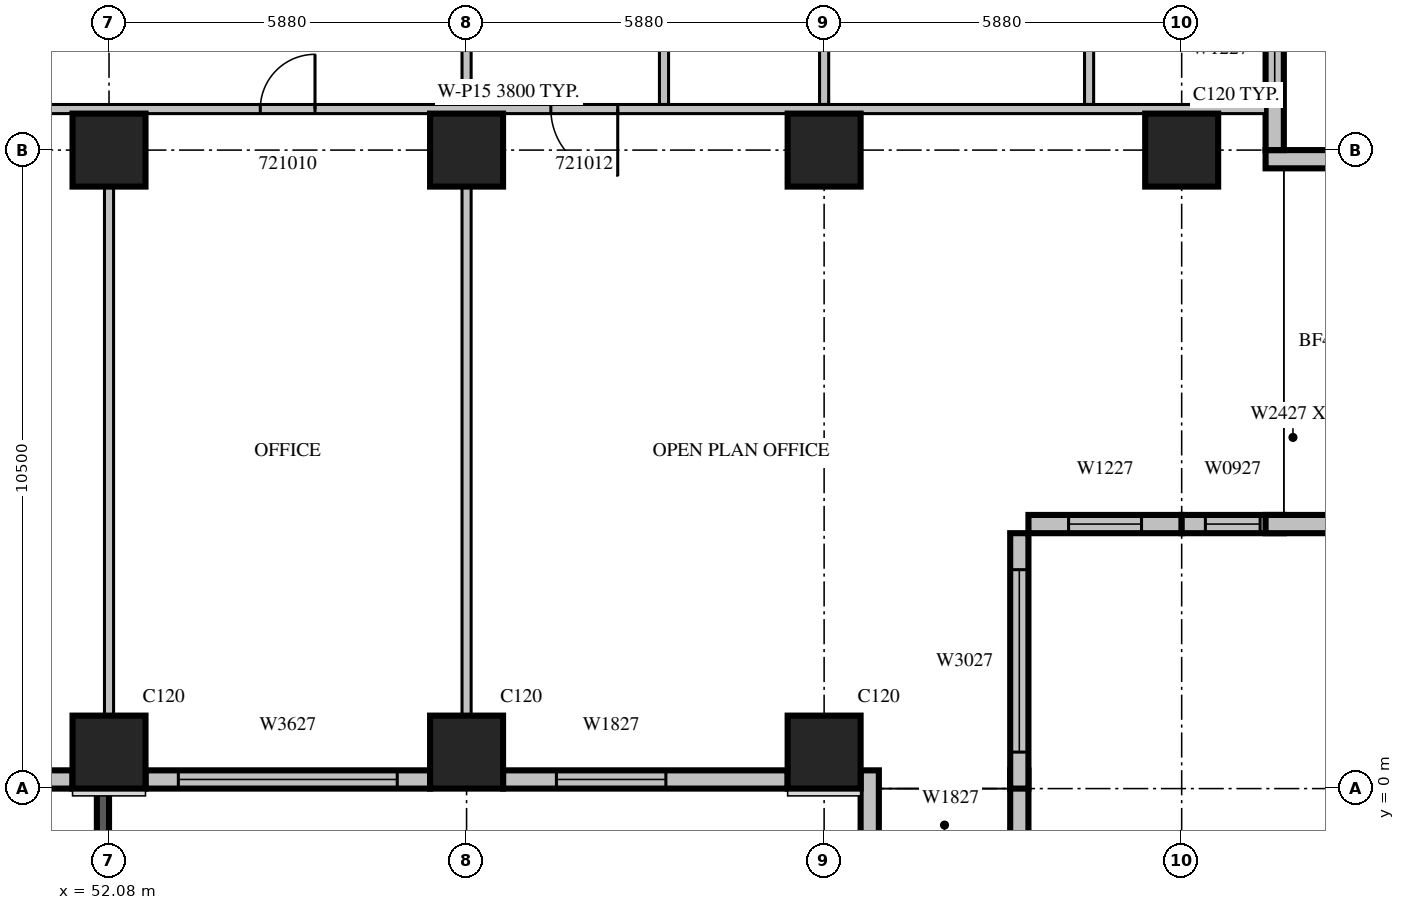
"""IFC4 building model, lengths in metres.
Left out: names, types, materials, properties, quantities, classifications, styles, units other than length and angle.
Written with IfcOpenShell. Run it as: python <this file> out.ifc"""

import sys

from ifc_helpers import new_model, si_unit, direction, frame, frame_2d, origin, origin_2d, place, context, subcontext, project, spatial, rectangle, extrude, source, transform, mapped, element, fill, save


model = new_model("IFC4")
c1 = context("Model", 3, precision=1e-05, world=origin(), true_north=direction((0.0, 1.0)))
c2 = subcontext(c1, "Body", "Model", "MODEL_VIEW")
j1 = project(units=[si_unit("LENGTHUNIT", "METRE"), si_unit("PLANEANGLEUNIT", "RADIAN")], contexts=[c1])
p1 = place(None, origin())
s1 = spatial("IfcSite", under=j1, at=p1, CompositionType="ELEMENT")
p2 = place(p1, origin())
s2 = spatial("IfcBuilding", under=s1, at=p2, CompositionType="ELEMENT")
p3 = place(p2, frame((0.0, 0.0, 99.3)))
s3 = spatial("IfcBuildingStorey", under=s2, at=p3, CompositionType="ELEMENT", Elevation=99.3)
m1 = source(origin(), c2, "Body", "SweptSolid", [
    extrude(rectangle(XDim=1.2, YDim=1.2, at=origin_2d()), origin(), (0.0, 0.0, 1.0), 4.2),
])
for number, where, z_axis, x_axis in (
    (1, (52.08, 0.6, 0.0), (0.0, 0.0, 1.0), (1.0, 0.0, 0.0)),
    (2, (57.96, 0.6, 0.0), (0.0, 0.0, 1.0), (1.0, 0.0, 0.0)),
    (3, (63.84, 0.6, 0.0), (0.0, 0.0, 1.0), (1.0, 0.0, 0.0)),
    (4, (52.08, 10.5, 0.0), (0.0, 0.0, 1.0), (1.0, 0.0, 0.0)),
    (5, (57.96, 10.5, 0.0), (0.0, 0.0, 1.0), (1.0, 0.0, 0.0)),
    (6, (63.84, 10.5, 0.0), (0.0, 0.0, 1.0), (1.0, 0.0, 0.0)),
    (7, (69.72, 10.5, 0.0), (0.0, 0.0, 1.0), (1.0, 0.0, 0.0)),
):
    element("IfcColumn", number, at=place(p3, frame(where, z_axis=z_axis, x_axis=x_axis)), inside=s3, PredefinedType="COLUMN", context=c2, shape_type="MappedRepresentation", body=[
        mapped(m1, transform((0.0, 0.0, 0.0), scale=1.0)),
    ])
m2 = source(origin(), c2, "Body", "SweptSolid", [
    extrude(rectangle(XDim=3.9, YDim=0.2, at=frame_2d((1.95, 0.0))), origin(), (0.0, 0.0, 1.0), 3.8),
])
p4 = place(p3, frame((51.98, 0.0, 0.0), z_axis=(0.0, 0.0, 1.0), x_axis=(0.0, -1.0, 0.0)))
e8 = element("IfcWall", 8, at=p4, inside=s3, PredefinedType="SOLIDWALL", context=c2, shape_type="MappedRepresentation", body=[
    mapped(m2, transform((0.0, 0.0, 0.0), scale=1.0)),
])
m3 = source(origin(), c2, "Body", "SweptSolid", [
    extrude(rectangle(XDim=2.4, YDim=2.7, at=frame_2d((1.2, 1.35))), frame((0.0, 0.11, 0.0), z_axis=(0.0, -1.0, 0.0), x_axis=(1.0, 0.0, 0.0)), (0.0, 0.0, 1.0), 0.22),
])
p5 = place(p4, frame((0.75, 0.0, 0.6)))
e9 = element("IfcOpeningElement", 9, at=p5, cuts=e8, PredefinedType="OPENING", context=c2, shape_type="MappedRepresentation", body=[
    mapped(m3, transform((0.0, 0.0, 0.0), scale=1.0)),
])
m4 = source(origin(), c2, "Body", "SweptSolid", [
    extrude(rectangle(XDim=4.68, YDim=0.3, at=frame_2d((2.34, 0.0))), origin(), (0.0, 0.0, 1.0), 3.8),
])
p6 = place(p3, frame((46.8, 0.15, 0.0), z_axis=(0.0, 0.0, 1.0), x_axis=(1.0, 0.0, 0.0)))
e10 = element("IfcWall", 10, at=p6, inside=s3, PredefinedType="STANDARD", context=c2, shape_type="MappedRepresentation", body=[
    mapped(m4, transform((0.0, 0.0, 0.0), scale=1.0)),
])
m5 = source(origin(), c2, "Body", "SweptSolid", [
    extrude(rectangle(XDim=1.0, YDim=2.1, at=frame_2d((0.5, 1.05))), frame((0.0, 0.16, 0.0), z_axis=(0.0, -1.0, 0.0), x_axis=(1.0, 0.0, 0.0)), (0.0, 0.0, 1.0), 0.32),
])
p7 = place(p6, frame((1.84, 0.0, 0.0)))
e11 = element("IfcOpeningElement", 11, at=p7, cuts=e10, PredefinedType="OPENING", context=c2, shape_type="MappedRepresentation", body=[
    mapped(m5, transform((0.0, 0.0, 0.0), scale=1.0)),
])
p8 = place(p3, frame((52.68, 0.15, 0.0), z_axis=(0.0, 0.0, 1.0), x_axis=(1.0, 0.0, 0.0)))
e12 = element("IfcWall", 12, at=p8, inside=s3, PredefinedType="STANDARD", context=c2, shape_type="MappedRepresentation", body=[
    mapped(m4, transform((0.0, 0.0, 0.0), scale=1.0)),
])
m6 = source(origin(), c2, "Body", "SweptSolid", [
    extrude(rectangle(XDim=3.6, YDim=2.7, at=frame_2d((1.8, 1.35))), frame((0.0, 0.16, 0.0), z_axis=(0.0, -1.0, 0.0), x_axis=(1.0, 0.0, 0.0)), (0.0, 0.0, 1.0), 0.32),
])
p9 = place(p8, frame((0.54, 0.0, 0.6)))
e13 = element("IfcOpeningElement", 13, at=p9, cuts=e12, PredefinedType="OPENING", context=c2, shape_type="MappedRepresentation", body=[
    mapped(m6, transform((0.0, 0.0, 0.0), scale=1.0)),
])
p10 = place(p3, frame((58.56, 0.15, 0.0), z_axis=(0.0, 0.0, 1.0), x_axis=(1.0, 0.0, 0.0)))
e14 = element("IfcWall", 14, at=p10, inside=s3, PredefinedType="STANDARD", context=c2, shape_type="MappedRepresentation", body=[
    mapped(m4, transform((0.0, 0.0, 0.0), scale=1.0)),
])
m7 = source(origin(), c2, "Body", "SweptSolid", [
    extrude(rectangle(XDim=1.8, YDim=2.7, at=frame_2d((0.9, 1.35))), frame((0.0, 0.16, 0.0), z_axis=(0.0, -1.0, 0.0), x_axis=(1.0, 0.0, 0.0)), (0.0, 0.0, 1.0), 0.32),
])
p11 = place(p10, frame((0.877, 0.0, 0.6)))
e15 = element("IfcOpeningElement", 15, at=p11, cuts=e14, PredefinedType="OPENING", context=c2, shape_type="MappedRepresentation", body=[
    mapped(m7, transform((0.0, 0.0, 0.0), scale=1.0)),
])
m8 = source(origin(), c2, "Body", "SweptSolid", [
    extrude(rectangle(XDim=1.2, YDim=0.3, at=frame_2d((0.6, 0.0))), origin(), (0.0, 0.0, 1.0), 3.8),
])
for number, where, z_axis, x_axis in (
    (16, (64.59, 0.3, 0.0), (0.0, 0.0, 1.0), (0.0, -1.0, 0.0)),
    (17, (67.05, 0.3, 0.0), (0.0, 0.0, 1.0), (0.0, -1.0, 0.0)),
):
    element("IfcWall", number, at=place(p3, frame(where, z_axis=z_axis, x_axis=x_axis)), inside=s3, PredefinedType="STANDARD", context=c2, shape_type="MappedRepresentation", body=[
        mapped(m8, transform((0.0, 0.0, 0.0), scale=1.0)),
    ])
m9 = source(origin(), c2, "Body", "SweptSolid", [
    extrude(rectangle(XDim=4.2, YDim=0.3, at=frame_2d((2.1, 0.0))), origin(), (0.0, 0.0, 1.0), 3.8),
])
p12 = place(p3, frame((67.05, 0.0, 0.0), z_axis=(0.0, 0.0, 1.0), x_axis=(0.0, 1.0, 0.0)))
e18 = element("IfcWall", 18, at=p12, inside=s3, PredefinedType="STANDARD", context=c2, shape_type="MappedRepresentation", body=[
    mapped(m9, transform((0.0, 0.0, 0.0), scale=1.0)),
])
m10 = source(origin(), c2, "Body", "SweptSolid", [
    extrude(rectangle(XDim=3.0, YDim=2.7, at=frame_2d((1.5, 1.35))), frame((0.0, 0.16, 0.0), z_axis=(0.0, -1.0, 0.0), x_axis=(1.0, 0.0, 0.0)), (0.0, 0.0, 1.0), 0.32),
])
p13 = place(p12, frame((0.6, 0.0, 0.6)))
e19 = element("IfcOpeningElement", 19, at=p13, cuts=e18, PredefinedType="OPENING", context=c2, shape_type="MappedRepresentation", body=[
    mapped(m10, transform((0.0, 0.0, 0.0), scale=1.0)),
])
m11 = source(origin(), c2, "Body", "SweptSolid", [
    extrude(rectangle(XDim=2.52, YDim=0.3, at=frame_2d((1.26, 0.0))), origin(), (0.0, 0.0, 1.0), 3.8),
])
p14 = place(p3, frame((67.2, 4.35, 0.0), z_axis=(0.0, 0.0, 1.0), x_axis=(1.0, 0.0, 0.0)))
e20 = element("IfcWall", 20, at=p14, inside=s3, PredefinedType="STANDARD", context=c2, shape_type="MappedRepresentation", body=[
    mapped(m11, transform((0.0, 0.0, 0.0), scale=1.0)),
])
m12 = source(origin(), c2, "Body", "SweptSolid", [
    extrude(rectangle(XDim=1.2, YDim=2.7, at=frame_2d((0.6, 1.35))), frame((0.0, 0.16, 0.0), z_axis=(0.0, -1.0, 0.0), x_axis=(1.0, 0.0, 0.0)), (0.0, 0.0, 1.0), 0.32),
])
p15 = place(p14, frame((0.66, 0.0, 0.6)))
e21 = element("IfcOpeningElement", 21, at=p15, cuts=e20, PredefinedType="OPENING", context=c2, shape_type="MappedRepresentation", body=[
    mapped(m12, transform((0.0, 0.0, 0.0), scale=1.0)),
])
m13 = source(origin(), c2, "Body", "SweptSolid", [
    extrude(rectangle(XDim=1.68, YDim=0.3, at=frame_2d((0.84, 0.0))), origin(), (0.0, 0.0, 1.0), 3.8),
])
p16 = place(p3, frame((69.72, 4.35, 0.0), z_axis=(0.0, 0.0, 1.0), x_axis=(1.0, 0.0, 0.0)))
e22 = element("IfcWall", 22, at=p16, inside=s3, PredefinedType="STANDARD", context=c2, shape_type="MappedRepresentation", body=[
    mapped(m13, transform((0.0, 0.0, 0.0), scale=1.0)),
])
m14 = source(origin(), c2, "Body", "SweptSolid", [
    extrude(rectangle(XDim=0.9, YDim=2.7, at=frame_2d((0.45, 1.35))), frame((0.0, 0.16, 0.0), z_axis=(0.0, -1.0, 0.0), x_axis=(1.0, 0.0, 0.0)), (0.0, 0.0, 1.0), 0.32),
])
p17 = place(p16, frame((0.39, 0.0, 0.6)))
e23 = element("IfcOpeningElement", 23, at=p17, cuts=e22, PredefinedType="OPENING", context=c2, shape_type="MappedRepresentation", body=[
    mapped(m14, transform((0.0, 0.0, 0.0), scale=1.0)),
])
for number, where, z_axis, x_axis in (
    (24, (71.1, 4.35, 0.0), (0.0, 0.0, 1.0), (1.0, 0.0, 0.0)),
    (25, (71.1, 10.35, 0.0), (0.0, 0.0, 1.0), (1.0, 0.0, 0.0)),
):
    element("IfcWall", number, at=place(p3, frame(where, z_axis=z_axis, x_axis=x_axis)), inside=s3, PredefinedType="STANDARD", context=c2, shape_type="MappedRepresentation", body=[
        mapped(m8, transform((0.0, 0.0, 0.0), scale=1.0)),
    ])
m15 = source(origin(), c2, "Body", "SweptSolid", [
    extrude(rectangle(XDim=6.3, YDim=0.3, at=frame_2d((3.15, 0.0))), origin(), (0.0, 0.0, 1.0), 3.8),
])
p18 = place(p3, frame((71.25, 10.5, 0.0), z_axis=(0.0, 0.0, 1.0), x_axis=(0.0, 1.0, 0.0)))
e26 = element("IfcWall", 26, at=p18, inside=s3, PredefinedType="STANDARD", context=c2, shape_type="MappedRepresentation", body=[
    mapped(m15, transform((0.0, 0.0, 0.0), scale=1.0)),
])
p19 = place(p18, frame((1.062, 0.0, 0.6)))
e27 = element("IfcOpeningElement", 27, at=p19, cuts=e26, PredefinedType="OPENING", context=c2, shape_type="MappedRepresentation", body=[
    mapped(m12, transform((0.0, 0.0, 0.0), scale=1.0)),
])
m16 = source(origin(), c2, "Body", "SweptSolid", [
    extrude(rectangle(XDim=8.702, YDim=0.15, at=frame_2d((4.351, 0.0))), origin(), (0.0, 0.0, 1.0), 3.8),
])
p20 = place(p3, frame((52.08, 1.199, 0.0), z_axis=(0.0, 0.0, 1.0), x_axis=(0.0, 1.0, 0.0)))
e28 = element("IfcWall", 28, at=p20, inside=s3, PredefinedType="PARTITIONING", context=c2, shape_type="MappedRepresentation", body=[
    mapped(m16, transform((0.0, 0.0, 0.0), scale=1.0)),
])
m17 = source(origin(), c2, "Body", "SweptSolid", [
    extrude(rectangle(XDim=3.75, YDim=0.15, at=frame_2d((1.875, 0.0))), origin(), (0.0, 0.0, 1.0), 3.8),
])
for number, where, z_axis, x_axis in (
    (29, (61.207, 11.25, 0.0), (0.0, 0.0, 1.0), (0.0, 1.0, 0.0)),
    (30, (63.84, 11.25, 0.0), (0.0, 0.0, 1.0), (0.0, 1.0, 0.0)),
    (31, (68.197, 11.25, 0.0), (0.0, 0.0, 1.0), (0.0, 1.0, 0.0)),
):
    element("IfcWall", number, at=place(p3, frame(where, z_axis=z_axis, x_axis=x_axis)), inside=s3, PredefinedType="PARTITIONING", context=c2, shape_type="MappedRepresentation", body=[
        mapped(m17, transform((0.0, 0.0, 0.0), scale=1.0)),
    ])
p21 = place(p3, frame((57.96, 1.199, 0.0), z_axis=(0.0, 0.0, 1.0), x_axis=(0.0, 1.0, 0.0)))
e32 = element("IfcWall", 32, at=p21, inside=s3, PredefinedType="PARTITIONING", context=c2, shape_type="MappedRepresentation", body=[
    mapped(m16, transform((0.0, 0.0, 0.0), scale=1.0)),
])
p22 = place(p3, frame((57.96, 11.25, 0.0), z_axis=(0.0, 0.0, 1.0), x_axis=(0.0, 1.0, 0.0)))
e33 = element("IfcWall", 33, at=p22, inside=s3, PredefinedType="PARTITIONING", context=c2, shape_type="MappedRepresentation", body=[
    mapped(m17, transform((0.0, 0.0, 0.0), scale=1.0)),
])
m18 = source(origin(), c2, "Body", "SweptSolid", [
    extrude(rectangle(XDim=24.9, YDim=0.15, at=frame_2d((12.45, 0.0))), origin(), (0.0, 0.0, 1.0), 3.8),
])
p23 = place(p3, frame((71.1, 11.175, 0.0), z_axis=(0.0, 0.0, 1.0), x_axis=(-1.0, 0.0, 0.0)))
e34 = element("IfcWall", 34, at=p23, inside=s3, PredefinedType="PARTITIONING", context=c2, shape_type="MappedRepresentation", body=[
    mapped(m18, transform((0.0, 0.0, 0.0), scale=1.0)),
])
m19 = source(origin(), c2, "Body", "SweptSolid", [
    extrude(rectangle(XDim=0.9, YDim=2.1, at=frame_2d((0.45, 1.05))), frame((0.0, 0.085, 0.0), z_axis=(0.0, -1.0, 0.0), x_axis=(1.0, 0.0, 0.0)), (0.0, 0.0, 1.0), 0.17),
])
p24 = place(p23, frame((21.512, 0.0, 0.0)))
e35 = element("IfcOpeningElement", 35, at=p24, cuts=e34, PredefinedType="OPENING", context=c2, shape_type="MappedRepresentation", body=[
    mapped(m19, transform((0.0, 0.0, 0.0), scale=1.0)),
])
p25 = place(p23, frame((15.633, 0.0, 0.0)))
e36 = element("IfcOpeningElement", 36, at=p25, cuts=e34, PredefinedType="OPENING", context=c2, shape_type="MappedRepresentation", body=[
    mapped(m19, transform((0.0, 0.0, 0.0), scale=1.0)),
])
m20 = source(origin(), c2, "Body", "SweptSolid", [
    extrude(rectangle(XDim=1.1, YDim=2.1, at=frame_2d((0.55, 1.05))), frame((0.0, 0.085, 0.0), z_axis=(0.0, -1.0, 0.0), x_axis=(1.0, 0.0, 0.0)), (0.0, 0.0, 1.0), 0.17),
])
p26 = place(p23, frame((10.654, 0.0, 0.0)))
e37 = element("IfcOpeningElement", 37, at=p26, cuts=e34, PredefinedType="OPENING", context=c2, shape_type="MappedRepresentation", body=[
    mapped(m20, transform((0.0, 0.0, 0.0), scale=1.0)),
])
m21 = source(origin(), c2, "Body", "SweptSolid", [
    extrude(rectangle(XDim=3.6, YDim=2.7, at=frame_2d((1.8, 1.35))), frame((0.0, 0.03, 0.0), z_axis=(0.0, -1.0, 0.0), x_axis=(1.0, 0.0, 0.0)), (0.0, 0.0, 1.0), 0.06),
])
p27 = place(p9, origin())
e38 = element("IfcWindow", 38, at=p27, inside=s3, PartitioningType="SINGLE_PANEL", PredefinedType="WINDOW", context=c2, shape_type="MappedRepresentation", body=[
    mapped(m21, transform((0.0, 0.0, 0.0), scale=1.0)),
])
fill(e13, e38)
m22 = source(origin(), c2, "Body", "SweptSolid", [
    extrude(rectangle(XDim=1.8, YDim=2.7, at=frame_2d((0.9, 1.35))), frame((0.0, 0.03, 0.0), z_axis=(0.0, -1.0, 0.0), x_axis=(1.0, 0.0, 0.0)), (0.0, 0.0, 1.0), 0.06),
])
p28 = place(p11, origin())
e39 = element("IfcWindow", 39, at=p28, inside=s3, PartitioningType="SINGLE_PANEL", PredefinedType="WINDOW", context=c2, shape_type="MappedRepresentation", body=[
    mapped(m22, transform((0.0, 0.0, 0.0), scale=1.0)),
])
fill(e15, e39)
m23 = source(origin(), c2, "Body", "SweptSolid", [
    extrude(rectangle(XDim=3.0, YDim=2.7, at=frame_2d((1.5, 1.35))), frame((0.0, 0.03, 0.0), z_axis=(0.0, -1.0, 0.0), x_axis=(1.0, 0.0, 0.0)), (0.0, 0.0, 1.0), 0.06),
])
p29 = place(p13, origin())
e40 = element("IfcWindow", 40, at=p29, inside=s3, PartitioningType="SINGLE_PANEL", PredefinedType="WINDOW", context=c2, shape_type="MappedRepresentation", body=[
    mapped(m23, transform((0.0, 0.0, 0.0), scale=1.0)),
])
fill(e19, e40)
m24 = source(origin(), c2, "Body", "SweptSolid", [
    extrude(rectangle(XDim=1.2, YDim=2.7, at=frame_2d((0.6, 1.35))), frame((0.0, 0.03, 0.0), z_axis=(0.0, -1.0, 0.0), x_axis=(1.0, 0.0, 0.0)), (0.0, 0.0, 1.0), 0.06),
])
p30 = place(p15, origin())
e41 = element("IfcWindow", 41, at=p30, inside=s3, PartitioningType="SINGLE_PANEL", PredefinedType="WINDOW", context=c2, shape_type="MappedRepresentation", body=[
    mapped(m24, transform((0.0, 0.0, 0.0), scale=1.0)),
])
fill(e21, e41)
m25 = source(origin(), c2, "Body", "SweptSolid", [
    extrude(rectangle(XDim=0.9, YDim=2.7, at=frame_2d((0.45, 1.35))), frame((0.0, 0.03, 0.0), z_axis=(0.0, -1.0, 0.0), x_axis=(1.0, 0.0, 0.0)), (0.0, 0.0, 1.0), 0.06),
])
p31 = place(p17, origin())
e42 = element("IfcWindow", 42, at=p31, inside=s3, PartitioningType="SINGLE_PANEL", PredefinedType="WINDOW", context=c2, shape_type="MappedRepresentation", body=[
    mapped(m25, transform((0.0, 0.0, 0.0), scale=1.0)),
])
fill(e23, e42)
p32 = place(p19, origin())
e43 = element("IfcWindow", 43, at=p32, inside=s3, PartitioningType="SINGLE_PANEL", PredefinedType="WINDOW", context=c2, shape_type="MappedRepresentation", body=[
    mapped(m24, transform((0.0, 0.0, 0.0), scale=1.0)),
])
fill(e27, e43)
m26 = source(origin(), c2, "Body", "SweptSolid", [
    extrude(rectangle(XDim=0.9, YDim=2.1, at=frame_2d((0.45, 1.05))), frame((0.0, 0.025, 0.0), z_axis=(0.0, -1.0, 0.0), x_axis=(1.0, 0.0, 0.0)), (0.0, 0.0, 1.0), 0.05),
])
p33 = place(p25, origin())
e44 = element("IfcDoor", 44, at=p33, inside=s3, OperationType="SINGLE_SWING_RIGHT", PredefinedType="DOOR", context=c2, shape_type="MappedRepresentation", body=[
    mapped(m26, transform((0.0, 0.0, 0.0), scale=1.0)),
])
fill(e36, e44)
m27 = source(origin(), c2, "Body", "SweptSolid", [
    extrude(rectangle(XDim=1.1, YDim=2.1, at=frame_2d((0.55, 1.05))), frame((0.0, 0.025, 0.0), z_axis=(0.0, -1.0, 0.0), x_axis=(1.0, 0.0, 0.0)), (0.0, 0.0, 1.0), 0.05),
])
p34 = place(p26, origin())
e45 = element("IfcDoor", 45, at=p34, inside=s3, OperationType="SINGLE_SWING_LEFT", PredefinedType="DOOR", context=c2, shape_type="MappedRepresentation", body=[
    mapped(m27, transform((0.0, 0.0, 0.0), scale=1.0)),
])
fill(e37, e45)
save(model, sys.argv[1])
